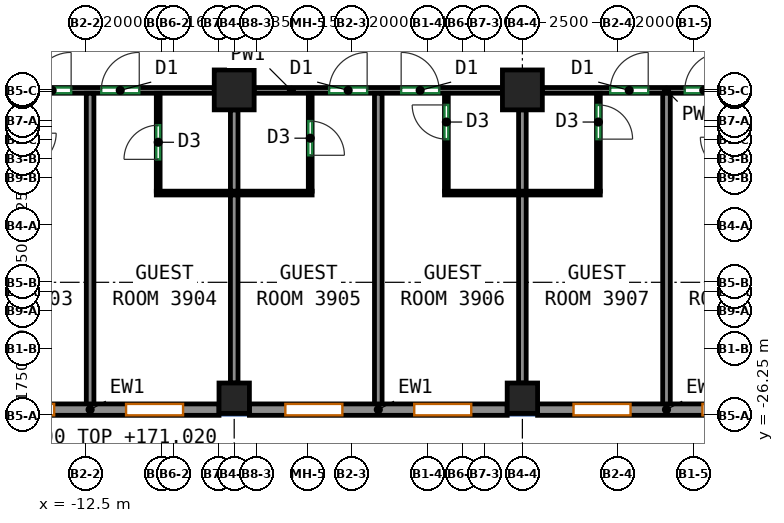
"""IFC4 building model, lengths in metres.
Left out: names, types, materials, properties, quantities, classifications, styles, units other than length and angle.
Written with IfcOpenShell. Run it as: python <this file> out.ifc"""

import sys

from ifc_helpers import new_model, si_unit, direction, frame, frame_2d, origin, origin_2d, place, context, subcontext, project, spatial, rectangle, extrude, source, transform, mapped, element, fill, save


model = new_model("IFC4")
c1 = context("Model", 3, precision=1e-05, world=origin(), true_north=direction((0.0, 1.0)))
c2 = subcontext(c1, "Body", "Model", "MODEL_VIEW")
j1 = project(units=[si_unit("LENGTHUNIT", "METRE"), si_unit("PLANEANGLEUNIT", "RADIAN")], contexts=[c1])
p1 = place(None, origin())
s1 = spatial("IfcSite", under=j1, at=p1, CompositionType="ELEMENT")
p2 = place(p1, origin())
s2 = spatial("IfcBuilding", under=s1, at=p2, CompositionType="ELEMENT")
p3 = place(p2, frame((0.0, 0.0, 168.5)))
s3 = spatial("IfcBuildingStorey", under=s2, at=p3, CompositionType="ELEMENT", Elevation=168.5)
m1 = source(origin(), c2, "Body", "SweptSolid", [
    extrude(rectangle(XDim=0.8, YDim=0.8, at=origin_2d()), origin(), (0.0, 0.0, 1.0), 3.12),
])
p4 = place(p3, frame((-8.583, -25.8, 0.0), z_axis=(0.0, 0.0, 1.0), x_axis=(1.0, 0.0, 0.0)))
e1 = element("IfcColumn", 1, at=p4, inside=s3, PredefinedType="COLUMN", context=c2, shape_type="MappedRepresentation", body=[
    mapped(m1, transform((0.0, 0.0, 0.0))),
])
m2 = source(origin(), c2, "Body", "SweptSolid", [
    extrude(rectangle(XDim=1.05, YDim=1.05, at=origin_2d()), origin(), (0.0, 0.0, 1.0), 3.12),
])
p5 = place(p3, frame((-8.583, -17.688, 0.0), z_axis=(0.0, 0.0, 1.0), x_axis=(1.0, 0.0, 0.0)))
e2 = element("IfcColumn", 2, at=p5, inside=s3, PredefinedType="COLUMN", context=c2, shape_type="MappedRepresentation", body=[
    mapped(m2, transform((0.0, 0.0, 0.0))),
])
p6 = place(p3, frame((-1.0, -25.8, 0.0), z_axis=(0.0, 0.0, 1.0), x_axis=(1.0, 0.0, 0.0)))
e3 = element("IfcColumn", 3, at=p6, inside=s3, PredefinedType="COLUMN", context=c2, shape_type="MappedRepresentation", body=[
    mapped(m1, transform((0.0, 0.0, 0.0))),
])
p7 = place(p3, frame((-1.0, -17.688, 0.0), z_axis=(0.0, 0.0, 1.0), x_axis=(1.0, 0.0, 0.0)))
e4 = element("IfcColumn", 4, at=p7, inside=s3, PredefinedType="COLUMN", context=c2, shape_type="MappedRepresentation", body=[
    mapped(m2, transform((0.0, 0.0, 0.0))),
])
m3 = source(origin(), c2, "Body", "SweptSolid", [
    extrude(rectangle(XDim=6.783, YDim=0.3, at=frame_2d((3.392, 0.0))), origin(), (0.0, 0.0, 1.0), 3.12),
])
p8 = place(p3, frame((-15.767, -26.1, 0.0), z_axis=(0.0, 0.0, 1.0), x_axis=(1.0, 0.0, 0.0)))
e5 = element("IfcWall", 5, at=p8, inside=s3, PredefinedType="SOLIDWALL", context=c2, shape_type="MappedRepresentation", body=[
    mapped(m3, transform((0.0, 0.0, 0.0))),
])
p9 = place(p8, frame((0.946, 0.0, 0.85)))
e6 = element("IfcOpeningElement", 6, at=p9, cuts=e5, PredefinedType="OPENING", context=c2, shape_type="SweptSolid", body=[
    extrude(rectangle(XDim=1.5, YDim=1.95, at=frame_2d((0.75, 0.975))), frame((0.0, 0.16, 0.0), z_axis=(0.0, -1.0, 0.0), x_axis=(1.0, 0.0, 0.0)), (0.0, 0.0, 1.0), 0.32),
])
p10 = place(p8, frame((4.338, 0.0, 0.85)))
e7 = element("IfcOpeningElement", 7, at=p10, cuts=e5, PredefinedType="OPENING", context=c2, shape_type="SweptSolid", body=[
    extrude(rectangle(XDim=1.5, YDim=1.95, at=frame_2d((0.75, 0.975))), frame((0.0, 0.16, 0.0), z_axis=(0.0, -1.0, 0.0), x_axis=(1.0, 0.0, 0.0)), (0.0, 0.0, 1.0), 0.32),
])
m4 = source(origin(), c2, "Body", "SweptSolid", [
    extrude(rectangle(XDim=6.783, YDim=0.3, at=frame_2d((3.392, 0.0))), origin(), (0.0, 0.0, 1.0), 3.12),
])
p11 = place(p3, frame((-8.183, -26.1, 0.0), z_axis=(0.0, 0.0, 1.0), x_axis=(1.0, 0.0, 0.0)))
e8 = element("IfcWall", 8, at=p11, inside=s3, PredefinedType="SOLIDWALL", context=c2, shape_type="MappedRepresentation", body=[
    mapped(m4, transform((0.0, 0.0, 0.0))),
])
p12 = place(p11, frame((0.946, 0.0, 0.85)))
e9 = element("IfcOpeningElement", 9, at=p12, cuts=e8, PredefinedType="OPENING", context=c2, shape_type="SweptSolid", body=[
    extrude(rectangle(XDim=1.5, YDim=1.95, at=frame_2d((0.75, 0.975))), frame((0.0, 0.16, 0.0), z_axis=(0.0, -1.0, 0.0), x_axis=(1.0, 0.0, 0.0)), (0.0, 0.0, 1.0), 0.32),
])
p13 = place(p11, frame((4.337, 0.0, 0.85)))
e10 = element("IfcOpeningElement", 10, at=p13, cuts=e8, PredefinedType="OPENING", context=c2, shape_type="SweptSolid", body=[
    extrude(rectangle(XDim=1.5, YDim=1.95, at=frame_2d((0.75, 0.975))), frame((0.0, 0.16, 0.0), z_axis=(0.0, -1.0, 0.0), x_axis=(1.0, 0.0, 0.0)), (0.0, 0.0, 1.0), 0.32),
])
p14 = place(p3, frame((-0.6, -26.1, 0.0), z_axis=(0.0, 0.0, 1.0), x_axis=(1.0, 0.0, 0.0)))
e11 = element("IfcWall", 11, at=p14, inside=s3, PredefinedType="SOLIDWALL", context=c2, shape_type="MappedRepresentation", body=[
    mapped(m4, transform((0.0, 0.0, 0.0))),
])
p15 = place(p14, frame((0.946, 0.0, 0.85)))
e12 = element("IfcOpeningElement", 12, at=p15, cuts=e11, PredefinedType="OPENING", context=c2, shape_type="SweptSolid", body=[
    extrude(rectangle(XDim=1.5, YDim=1.95, at=frame_2d((0.75, 0.975))), frame((0.0, 0.16, 0.0), z_axis=(0.0, -1.0, 0.0), x_axis=(1.0, 0.0, 0.0)), (0.0, 0.0, 1.0), 0.32),
])
p16 = place(p14, frame((4.337, 0.0, 0.85)))
e13 = element("IfcOpeningElement", 13, at=p16, cuts=e11, PredefinedType="OPENING", context=c2, shape_type="SweptSolid", body=[
    extrude(rectangle(XDim=1.5, YDim=1.95, at=frame_2d((0.75, 0.975))), frame((0.0, 0.16, 0.0), z_axis=(0.0, -1.0, 0.0), x_axis=(1.0, 0.0, 0.0)), (0.0, 0.0, 1.0), 0.32),
])
p17 = place(p3, frame((-15.642, -17.7, 0.0), z_axis=(0.0, 0.0, 1.0), x_axis=(1.0, 0.0, 0.0)))
e14 = element("IfcWall", 14, at=p17, inside=s3, PredefinedType="PARTITIONING", context=c2, shape_type="SweptSolid", body=[
    extrude(rectangle(XDim=6.534, YDim=0.15, at=frame_2d((3.267, 0.0))), origin(), (0.0, 0.0, 1.0), 3.12),
])
p18 = place(p17, frame((1.768, 0.0, 0.0)))
e15 = element("IfcOpeningElement", 15, at=p18, cuts=e14, PredefinedType="OPENING", context=c2, shape_type="SweptSolid", body=[
    extrude(rectangle(XDim=1.0, YDim=2.1, at=frame_2d((0.5, 1.05))), frame((0.0, 0.085, 0.0), z_axis=(0.0, -1.0, 0.0), x_axis=(1.0, 0.0, 0.0)), (0.0, 0.0, 1.0), 0.17),
])
p19 = place(p17, frame((3.56, 0.0, 0.0)))
e16 = element("IfcOpeningElement", 16, at=p19, cuts=e14, PredefinedType="OPENING", context=c2, shape_type="SweptSolid", body=[
    extrude(rectangle(XDim=1.0, YDim=2.1, at=frame_2d((0.5, 1.05))), frame((0.0, 0.085, 0.0), z_axis=(0.0, -1.0, 0.0), x_axis=(1.0, 0.0, 0.0)), (0.0, 0.0, 1.0), 0.17),
])
p20 = place(p3, frame((-8.058, -17.7, 0.0), z_axis=(0.0, 0.0, 1.0), x_axis=(1.0, 0.0, 0.0)))
e17 = element("IfcWall", 17, at=p20, inside=s3, PredefinedType="PARTITIONING", context=c2, shape_type="SweptSolid", body=[
    extrude(rectangle(XDim=6.533, YDim=0.15, at=frame_2d((3.267, 0.0))), origin(), (0.0, 0.0, 1.0), 3.12),
])
p21 = place(p20, frame((1.973, 0.0, 0.0)))
e18 = element("IfcOpeningElement", 18, at=p21, cuts=e17, PredefinedType="OPENING", context=c2, shape_type="SweptSolid", body=[
    extrude(rectangle(XDim=1.0, YDim=2.1, at=frame_2d((0.5, 1.05))), frame((0.0, 0.085, 0.0), z_axis=(0.0, -1.0, 0.0), x_axis=(1.0, 0.0, 0.0)), (0.0, 0.0, 1.0), 0.17),
])
p22 = place(p20, frame((3.868, 0.0, 0.0)))
e19 = element("IfcOpeningElement", 19, at=p22, cuts=e17, PredefinedType="OPENING", context=c2, shape_type="SweptSolid", body=[
    extrude(rectangle(XDim=1.0, YDim=2.1, at=frame_2d((0.5, 1.05))), frame((0.0, 0.085, 0.0), z_axis=(0.0, -1.0, 0.0), x_axis=(1.0, 0.0, 0.0)), (0.0, 0.0, 1.0), 0.17),
])
p23 = place(p3, frame((-0.475, -17.7, 0.0), z_axis=(0.0, 0.0, 1.0), x_axis=(1.0, 0.0, 0.0)))
e20 = element("IfcWall", 20, at=p23, inside=s3, PredefinedType="PARTITIONING", context=c2, shape_type="SweptSolid", body=[
    extrude(rectangle(XDim=6.533, YDim=0.15, at=frame_2d((3.267, 0.0))), origin(), (0.0, 0.0, 1.0), 3.12),
])
p24 = place(p23, frame((1.786, 0.0, 0.0)))
e21 = element("IfcOpeningElement", 21, at=p24, cuts=e20, PredefinedType="OPENING", context=c2, shape_type="SweptSolid", body=[
    extrude(rectangle(XDim=1.0, YDim=2.1, at=frame_2d((0.5, 1.05))), frame((0.0, 0.085, 0.0), z_axis=(0.0, -1.0, 0.0), x_axis=(1.0, 0.0, 0.0)), (0.0, 0.0, 1.0), 0.17),
])
p25 = place(p23, frame((3.748, 0.0, 0.0)))
e22 = element("IfcOpeningElement", 22, at=p25, cuts=e20, PredefinedType="OPENING", context=c2, shape_type="SweptSolid", body=[
    extrude(rectangle(XDim=1.0, YDim=2.1, at=frame_2d((0.5, 1.05))), frame((0.0, 0.085, 0.0), z_axis=(0.0, -1.0, 0.0), x_axis=(1.0, 0.0, 0.0)), (0.0, 0.0, 1.0), 0.17),
])
p26 = place(p3, frame((-12.375, -26.0, 0.0), z_axis=(0.0, 0.0, 1.0), x_axis=(0.0, 1.0, 0.0)))
e23 = element("IfcWall", 23, at=p26, inside=s3, PredefinedType="PARTITIONING", context=c2, shape_type="SweptSolid", body=[
    extrude(rectangle(XDim=8.223, YDim=0.2, at=frame_2d((4.111, 0.0))), origin(), (0.0, 0.0, 1.0), 3.12),
])
p27 = place(p3, frame((-10.583, -20.352, 0.0), z_axis=(0.0, 0.0, 1.0), x_axis=(0.0, 1.0, 0.0)))
e24 = element("IfcWall", 24, at=p27, inside=s3, PredefinedType="PARTITIONING", context=c2, shape_type="SweptSolid", body=[
    extrude(rectangle(XDim=2.575, YDim=0.1, at=frame_2d((1.288, 0.0))), origin(), (0.0, 0.0, 1.0), 3.12),
])
p28 = place(p27, frame((0.837, 0.0, 0.0)))
e25 = element("IfcOpeningElement", 25, at=p28, cuts=e24, PredefinedType="OPENING", context=c2, shape_type="SweptSolid", body=[
    extrude(rectangle(XDim=0.9, YDim=2.1, at=frame_2d((0.45, 1.05))), frame((0.0, 0.06, 0.0), z_axis=(0.0, -1.0, 0.0), x_axis=(1.0, 0.0, 0.0)), (0.0, 0.0, 1.0), 0.12),
])
p29 = place(p3, frame((-10.633, -20.402, 0.0), z_axis=(0.0, 0.0, 1.0), x_axis=(1.0, 0.0, 0.0)))
e26 = element("IfcWall", 26, at=p29, inside=s3, PredefinedType="PARTITIONING", context=c2, shape_type="SweptSolid", body=[
    extrude(rectangle(XDim=4.1, YDim=0.1, at=frame_2d((2.05, 0.0))), origin(), (0.0, 0.0, 1.0), 3.12),
])
p30 = place(p3, frame((-8.583, -25.4, 0.0), z_axis=(0.0, 0.0, 1.0), x_axis=(0.0, 1.0, 0.0)))
e27 = element("IfcWall", 27, at=p30, inside=s3, PredefinedType="PARTITIONING", context=c2, shape_type="SweptSolid", body=[
    extrude(rectangle(XDim=4.948, YDim=0.2, at=frame_2d((2.474, 0.0))), origin(), (0.0, 0.0, 1.0), 3.12),
])
p31 = place(p3, frame((-8.583, -20.352, 0.0), z_axis=(0.0, 0.0, 1.0), x_axis=(0.0, 1.0, 0.0)))
e28 = element("IfcWall", 28, at=p31, inside=s3, PredefinedType="PARTITIONING", context=c2, shape_type="SweptSolid", body=[
    extrude(rectangle(XDim=2.14, YDim=0.2, at=frame_2d((1.07, 0.0))), origin(), (0.0, 0.0, 1.0), 3.12),
])
p32 = place(p3, frame((-6.583, -17.777, 0.0), z_axis=(0.0, 0.0, 1.0), x_axis=(0.0, -1.0, 0.0)))
e29 = element("IfcWall", 29, at=p32, inside=s3, PredefinedType="PARTITIONING", context=c2, shape_type="SweptSolid", body=[
    extrude(rectangle(XDim=2.575, YDim=0.1, at=frame_2d((1.288, 0.0))), origin(), (0.0, 0.0, 1.0), 3.12),
])
p33 = place(p32, frame((0.731, 0.0, 0.0)))
e30 = element("IfcOpeningElement", 30, at=p33, cuts=e29, PredefinedType="OPENING", context=c2, shape_type="SweptSolid", body=[
    extrude(rectangle(XDim=0.9, YDim=2.1, at=frame_2d((0.45, 1.05))), frame((0.0, 0.06, 0.0), z_axis=(0.0, -1.0, 0.0), x_axis=(1.0, 0.0, 0.0)), (0.0, 0.0, 1.0), 0.12),
])
p34 = place(p3, frame((-4.792, -26.0, 0.0), z_axis=(0.0, 0.0, 1.0), x_axis=(0.0, 1.0, 0.0)))
e31 = element("IfcWall", 31, at=p34, inside=s3, PredefinedType="PARTITIONING", context=c2, shape_type="SweptSolid", body=[
    extrude(rectangle(XDim=8.223, YDim=0.2, at=frame_2d((4.111, 0.0))), origin(), (0.0, 0.0, 1.0), 3.12),
])
p35 = place(p3, frame((-3.0, -20.352, 0.0), z_axis=(0.0, 0.0, 1.0), x_axis=(0.0, 1.0, 0.0)))
e32 = element("IfcWall", 32, at=p35, inside=s3, PredefinedType="PARTITIONING", context=c2, shape_type="SweptSolid", body=[
    extrude(rectangle(XDim=2.575, YDim=0.1, at=frame_2d((1.288, 0.0))), origin(), (0.0, 0.0, 1.0), 3.12),
])
p36 = place(p35, frame((1.369, 0.0, 0.0)))
e33 = element("IfcOpeningElement", 33, at=p36, cuts=e32, PredefinedType="OPENING", context=c2, shape_type="SweptSolid", body=[
    extrude(rectangle(XDim=0.9, YDim=2.1, at=frame_2d((0.45, 1.05))), frame((0.0, 0.06, 0.0), z_axis=(0.0, -1.0, 0.0), x_axis=(1.0, 0.0, 0.0)), (0.0, 0.0, 1.0), 0.12),
])
p37 = place(p3, frame((-3.05, -20.402, 0.0), z_axis=(0.0, 0.0, 1.0), x_axis=(1.0, 0.0, 0.0)))
e34 = element("IfcWall", 34, at=p37, inside=s3, PredefinedType="PARTITIONING", context=c2, shape_type="SweptSolid", body=[
    extrude(rectangle(XDim=4.1, YDim=0.1, at=frame_2d((2.05, 0.0))), origin(), (0.0, 0.0, 1.0), 3.12),
])
p38 = place(p3, frame((-1.0, -25.4, 0.0), z_axis=(0.0, 0.0, 1.0), x_axis=(0.0, 1.0, 0.0)))
e35 = element("IfcWall", 35, at=p38, inside=s3, PredefinedType="PARTITIONING", context=c2, shape_type="SweptSolid", body=[
    extrude(rectangle(XDim=4.948, YDim=0.2, at=frame_2d((2.474, 0.0))), origin(), (0.0, 0.0, 1.0), 3.12),
])
p39 = place(p3, frame((-1.0, -20.352, 0.0), z_axis=(0.0, 0.0, 1.0), x_axis=(0.0, 1.0, 0.0)))
e36 = element("IfcWall", 36, at=p39, inside=s3, PredefinedType="PARTITIONING", context=c2, shape_type="SweptSolid", body=[
    extrude(rectangle(XDim=2.14, YDim=0.2, at=frame_2d((1.07, 0.0))), origin(), (0.0, 0.0, 1.0), 3.12),
])
p40 = place(p3, frame((1.0, -17.777, 0.0), z_axis=(0.0, 0.0, 1.0), x_axis=(0.0, -1.0, 0.0)))
e37 = element("IfcWall", 37, at=p40, inside=s3, PredefinedType="PARTITIONING", context=c2, shape_type="SweptSolid", body=[
    extrude(rectangle(XDim=2.575, YDim=0.1, at=frame_2d((1.288, 0.0))), origin(), (0.0, 0.0, 1.0), 3.12),
])
p41 = place(p40, frame((0.306, 0.0, 0.0)))
e38 = element("IfcOpeningElement", 38, at=p41, cuts=e37, PredefinedType="OPENING", context=c2, shape_type="SweptSolid", body=[
    extrude(rectangle(XDim=0.9, YDim=2.1, at=frame_2d((0.45, 1.05))), frame((0.0, 0.06, 0.0), z_axis=(0.0, -1.0, 0.0), x_axis=(1.0, 0.0, 0.0)), (0.0, 0.0, 1.0), 0.12),
])
p42 = place(p3, frame((2.792, -26.0, 0.0), z_axis=(0.0, 0.0, 1.0), x_axis=(0.0, 1.0, 0.0)))
e39 = element("IfcWall", 39, at=p42, inside=s3, PredefinedType="PARTITIONING", context=c2, shape_type="SweptSolid", body=[
    extrude(rectangle(XDim=8.223, YDim=0.2, at=frame_2d((4.111, 0.0))), origin(), (0.0, 0.0, 1.0), 3.12),
])
p43 = place(p9, origin())
e40 = element("IfcWindow", 40, at=p43, inside=s3, PartitioningType="SINGLE_PANEL", PredefinedType="WINDOW", context=c2, shape_type="SweptSolid", body=[
    extrude(rectangle(XDim=1.5, YDim=1.95, at=frame_2d((0.75, 0.975))), frame((0.0, 0.03, 0.0), z_axis=(0.0, -1.0, 0.0), x_axis=(1.0, 0.0, 0.0)), (0.0, 0.0, 1.0), 0.06),
])
fill(e6, e40)
p44 = place(p10, origin())
e41 = element("IfcWindow", 41, at=p44, inside=s3, PartitioningType="SINGLE_PANEL", PredefinedType="WINDOW", context=c2, shape_type="SweptSolid", body=[
    extrude(rectangle(XDim=1.5, YDim=1.95, at=frame_2d((0.75, 0.975))), frame((0.0, 0.03, 0.0), z_axis=(0.0, -1.0, 0.0), x_axis=(1.0, 0.0, 0.0)), (0.0, 0.0, 1.0), 0.06),
])
fill(e7, e41)
p45 = place(p12, origin())
e42 = element("IfcWindow", 42, at=p45, inside=s3, PartitioningType="SINGLE_PANEL", PredefinedType="WINDOW", context=c2, shape_type="SweptSolid", body=[
    extrude(rectangle(XDim=1.5, YDim=1.95, at=frame_2d((0.75, 0.975))), frame((0.0, 0.03, 0.0), z_axis=(0.0, -1.0, 0.0), x_axis=(1.0, 0.0, 0.0)), (0.0, 0.0, 1.0), 0.06),
])
fill(e9, e42)
p46 = place(p13, origin())
e43 = element("IfcWindow", 43, at=p46, inside=s3, PartitioningType="SINGLE_PANEL", PredefinedType="WINDOW", context=c2, shape_type="SweptSolid", body=[
    extrude(rectangle(XDim=1.5, YDim=1.95, at=frame_2d((0.75, 0.975))), frame((0.0, 0.03, 0.0), z_axis=(0.0, -1.0, 0.0), x_axis=(1.0, 0.0, 0.0)), (0.0, 0.0, 1.0), 0.06),
])
fill(e10, e43)
p47 = place(p15, origin())
e44 = element("IfcWindow", 44, at=p47, inside=s3, PartitioningType="SINGLE_PANEL", PredefinedType="WINDOW", context=c2, shape_type="SweptSolid", body=[
    extrude(rectangle(XDim=1.5, YDim=1.95, at=frame_2d((0.75, 0.975))), frame((0.0, 0.03, 0.0), z_axis=(0.0, -1.0, 0.0), x_axis=(1.0, 0.0, 0.0)), (0.0, 0.0, 1.0), 0.06),
])
fill(e12, e44)
p48 = place(p16, origin())
e45 = element("IfcWindow", 45, at=p48, inside=s3, PartitioningType="SINGLE_PANEL", PredefinedType="WINDOW", context=c2, shape_type="SweptSolid", body=[
    extrude(rectangle(XDim=1.5, YDim=1.95, at=frame_2d((0.75, 0.975))), frame((0.0, 0.03, 0.0), z_axis=(0.0, -1.0, 0.0), x_axis=(1.0, 0.0, 0.0)), (0.0, 0.0, 1.0), 0.06),
])
fill(e13, e45)
p49 = place(p28, origin())
e46 = element("IfcDoor", 46, at=p49, inside=s3, OperationType="SINGLE_SWING_LEFT", PredefinedType="DOOR", context=c2, shape_type="SweptSolid", body=[
    extrude(rectangle(XDim=0.9, YDim=2.1, at=frame_2d((0.45, 1.05))), frame((0.0, 0.025, 0.0), z_axis=(0.0, -1.0, 0.0), x_axis=(1.0, 0.0, 0.0)), (0.0, 0.0, 1.0), 0.05),
])
fill(e25, e46)
p50 = place(p33, origin())
e47 = element("IfcDoor", 47, at=p50, inside=s3, OperationType="SINGLE_SWING_RIGHT", PredefinedType="DOOR", context=c2, shape_type="SweptSolid", body=[
    extrude(rectangle(XDim=0.9, YDim=2.1, at=frame_2d((0.45, 1.05))), frame((0.0, 0.025, 0.0), z_axis=(0.0, -1.0, 0.0), x_axis=(1.0, 0.0, 0.0)), (0.0, 0.0, 1.0), 0.05),
])
fill(e30, e47)
p51 = place(p36, origin())
e48 = element("IfcDoor", 48, at=p51, inside=s3, OperationType="SINGLE_SWING_RIGHT", PredefinedType="DOOR", context=c2, shape_type="SweptSolid", body=[
    extrude(rectangle(XDim=0.9, YDim=2.1, at=frame_2d((0.45, 1.05))), frame((0.0, 0.025, 0.0), z_axis=(0.0, -1.0, 0.0), x_axis=(1.0, 0.0, 0.0)), (0.0, 0.0, 1.0), 0.05),
])
fill(e33, e48)
p52 = place(p41, origin())
e49 = element("IfcDoor", 49, at=p52, inside=s3, OperationType="SINGLE_SWING_RIGHT", PredefinedType="DOOR", context=c2, shape_type="SweptSolid", body=[
    extrude(rectangle(XDim=0.9, YDim=2.1, at=frame_2d((0.45, 1.05))), frame((0.0, 0.025, 0.0), z_axis=(0.0, -1.0, 0.0), x_axis=(1.0, 0.0, 0.0)), (0.0, 0.0, 1.0), 0.05),
])
fill(e38, e49)
p53 = place(p18, origin())
e50 = element("IfcDoor", 50, at=p53, inside=s3, OperationType="SINGLE_SWING_RIGHT", PredefinedType="DOOR", context=c2, shape_type="SweptSolid", body=[
    extrude(rectangle(XDim=1.0, YDim=2.1, at=frame_2d((0.5, 1.05))), frame((0.0, 0.025, 0.0), z_axis=(0.0, -1.0, 0.0), x_axis=(1.0, 0.0, 0.0)), (0.0, 0.0, 1.0), 0.05),
])
fill(e15, e50)
p54 = place(p19, origin())
e51 = element("IfcDoor", 51, at=p54, inside=s3, OperationType="SINGLE_SWING_RIGHT", PredefinedType="DOOR", context=c2, shape_type="SweptSolid", body=[
    extrude(rectangle(XDim=1.0, YDim=2.1, at=frame_2d((0.5, 1.05))), frame((0.0, 0.025, 0.0), z_axis=(0.0, -1.0, 0.0), x_axis=(1.0, 0.0, 0.0)), (0.0, 0.0, 1.0), 0.05),
])
fill(e16, e51)
p55 = place(p21, origin())
e52 = element("IfcDoor", 52, at=p55, inside=s3, OperationType="SINGLE_SWING_RIGHT", PredefinedType="DOOR", context=c2, shape_type="SweptSolid", body=[
    extrude(rectangle(XDim=1.0, YDim=2.1, at=frame_2d((0.5, 1.05))), frame((0.0, 0.025, 0.0), z_axis=(0.0, -1.0, 0.0), x_axis=(1.0, 0.0, 0.0)), (0.0, 0.0, 1.0), 0.05),
])
fill(e18, e52)
p56 = place(p22, origin())
e53 = element("IfcDoor", 53, at=p56, inside=s3, OperationType="SINGLE_SWING_LEFT", PredefinedType="DOOR", context=c2, shape_type="SweptSolid", body=[
    extrude(rectangle(XDim=1.0, YDim=2.1, at=frame_2d((0.5, 1.05))), frame((0.0, 0.025, 0.0), z_axis=(0.0, -1.0, 0.0), x_axis=(1.0, 0.0, 0.0)), (0.0, 0.0, 1.0), 0.05),
])
fill(e19, e53)
p57 = place(p24, origin())
e54 = element("IfcDoor", 54, at=p57, inside=s3, OperationType="SINGLE_SWING_RIGHT", PredefinedType="DOOR", context=c2, shape_type="SweptSolid", body=[
    extrude(rectangle(XDim=1.0, YDim=2.1, at=frame_2d((0.5, 1.05))), frame((0.0, 0.025, 0.0), z_axis=(0.0, -1.0, 0.0), x_axis=(1.0, 0.0, 0.0)), (0.0, 0.0, 1.0), 0.05),
])
fill(e21, e54)
p58 = place(p25, origin())
e55 = element("IfcDoor", 55, at=p58, inside=s3, OperationType="SINGLE_SWING_RIGHT", PredefinedType="DOOR", context=c2, shape_type="SweptSolid", body=[
    extrude(rectangle(XDim=1.0, YDim=2.1, at=frame_2d((0.5, 1.05))), frame((0.0, 0.025, 0.0), z_axis=(0.0, -1.0, 0.0), x_axis=(1.0, 0.0, 0.0)), (0.0, 0.0, 1.0), 0.05),
])
fill(e22, e55)
save(model, sys.argv[1])
